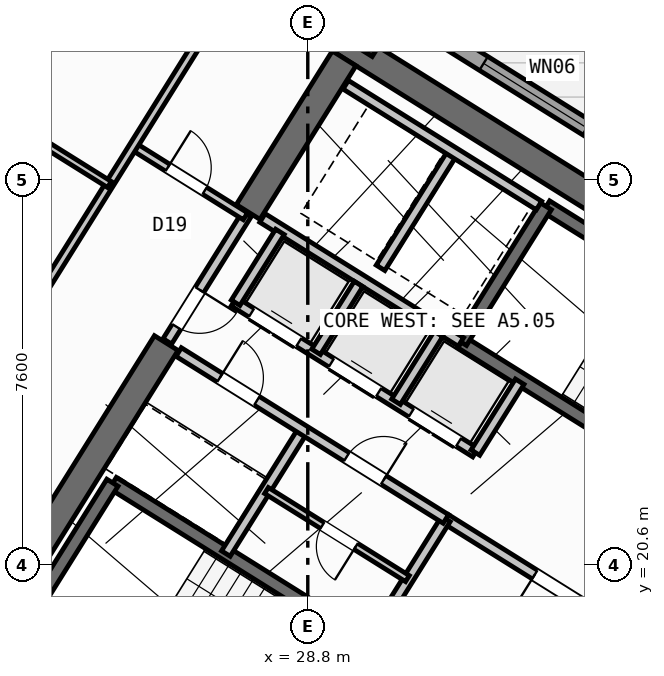
"""IFC4 building model, lengths in metres.
Left out: names, types, materials, properties, quantities, classifications, styles, units other than length and angle.
Written with IfcOpenShell. Run it as: python <this file> out.ifc"""

import sys

from ifc_helpers import new_model, si_unit, direction, frame, frame_2d, origin, origin_2d, place, context, subcontext, project, spatial, rectangle, hollow_rectangle, extrude, source, transform, mapped, element, fill, save


model = new_model("IFC4")
c1 = context("Model", 3, precision=1e-05, world=origin(), true_north=direction((0.0, 1.0)))
c2 = subcontext(c1, "Body", "Model", "MODEL_VIEW")
j1 = project(units=[si_unit("LENGTHUNIT", "METRE"), si_unit("PLANEANGLEUNIT", "RADIAN")], contexts=[c1])
p1 = place(None, origin())
s1 = spatial("IfcSite", under=j1, at=p1, CompositionType="ELEMENT")
p2 = place(p1, origin())
s2 = spatial("IfcBuilding", under=s1, at=p2, CompositionType="ELEMENT")
p3 = place(p2, frame((0.0, 0.0, 127.8)))
s3 = spatial("IfcBuildingStorey", under=s2, at=p3, CompositionType="ELEMENT", Elevation=127.8)
p4 = place(p3, frame((40.573, 24.01, 0.0), z_axis=(0.0, 0.0, 1.0), x_axis=(-0.848047359947, 0.529920442413, 0.0)))
e1 = element("IfcWall", 1, at=p4, inside=s3, PredefinedType="SHEAR", context=c2, shape_type="SweptSolid", body=[
    extrude(rectangle(XDim=13.14, YDim=0.55, at=frame_2d((6.57, 0.0))), origin(), (0.0, 0.0, 1.0), 4.55),
])
p5 = place(p3, frame((29.517, 30.594, 0.0), z_axis=(0.0, 0.0, 1.0), x_axis=(-0.529906864564, -0.848055844204, 0.0)))
e2 = element("IfcWall", 2, at=p5, inside=s3, PredefinedType="SHEAR", context=c2, shape_type="SweptSolid", body=[
    extrude(rectangle(XDim=3.575, YDim=0.55, at=frame_2d((1.788, 0.0))), origin(), (0.0, 0.0, 1.0), 4.55),
])
p6 = place(p3, frame((26.007, 24.976, 0.0), z_axis=(0.0, 0.0, 1.0), x_axis=(-0.529923795287, -0.848045264823, 0.0)))
e3 = element("IfcWall", 3, at=p6, inside=s3, PredefinedType="SHEAR", context=c2, shape_type="SweptSolid", body=[
    extrude(rectangle(XDim=6.425, YDim=0.55, at=frame_2d((3.212, 0.0))), origin(), (0.0, 0.0, 1.0), 4.55),
])
m1 = source(origin(), c2, "Body", "SweptSolid", [
    extrude(hollow_rectangle(XDim=0.9, YDim=0.9, WallThickness=0.036, at=origin_2d()), origin(), (0.0, 0.0, 1.0), 4.8),
])
p7 = place(p3, frame((29.928, 31.251, 0.0), z_axis=(0.0, 0.0, 1.0), x_axis=(-0.848048096156, 0.529919264233, 0.0)))
e4 = element("IfcColumn", 4, at=p7, inside=s3, PredefinedType="COLUMN", context=c2, shape_type="MappedRepresentation", body=[
    mapped(m1, transform((0.0, 0.0, 0.0), scale=1.0)),
])
p8 = place(p3, frame((29.268, 6.429, 0.0), z_axis=(0.0, 0.0, 1.0), x_axis=(-0.848049971435, 0.529916263149, 0.0)))
e5 = element("IfcWall", 5, at=p8, inside=s3, PredefinedType="STANDARD", context=c2, shape_type="SweptSolid", body=[
    extrude(rectangle(XDim=31.588, YDim=0.32, at=frame_2d((15.794, 0.0))), origin(), (0.0, 0.0, 1.0), 4.55),
])
p9 = place(p8, frame((15.901, 0.0, 0.0)))
e6 = element("IfcOpeningElement", 6, at=p9, cuts=e5, PredefinedType="OPENING", context=c2, shape_type="SweptSolid", body=[
    extrude(rectangle(XDim=1.2, YDim=2.15, at=frame_2d((0.6, 1.075))), frame((0.0, 0.17, 0.0), z_axis=(0.0, -1.0, 0.0), x_axis=(1.0, 0.0, 0.0)), (0.0, 0.0, 1.0), 0.34),
])
p10 = place(p8, frame((3.454, 0.0, 0.95)))
e7 = element("IfcOpeningElement", 7, at=p10, cuts=e5, PredefinedType="OPENING", context=c2, shape_type="SweptSolid", body=[
    extrude(rectangle(XDim=1.2, YDim=1.4, at=frame_2d((0.6, 0.7))), frame((0.0, 0.17, 0.0), z_axis=(0.0, -1.0, 0.0), x_axis=(1.0, 0.0, 0.0)), (0.0, 0.0, 1.0), 0.34),
])
p11 = place(p8, frame((7.561, 0.0, 0.85)))
e8 = element("IfcOpeningElement", 8, at=p11, cuts=e5, PredefinedType="OPENING", context=c2, shape_type="SweptSolid", body=[
    extrude(rectangle(XDim=1.8, YDim=1.5, at=frame_2d((0.9, 0.75))), frame((0.0, 0.17, 0.0), z_axis=(0.0, -1.0, 0.0), x_axis=(1.0, 0.0, 0.0)), (0.0, 0.0, 1.0), 0.34),
])
p12 = place(p8, frame((21.594, 0.0, 0.95)))
e9 = element("IfcOpeningElement", 9, at=p12, cuts=e5, PredefinedType="OPENING", context=c2, shape_type="SweptSolid", body=[
    extrude(rectangle(XDim=1.2, YDim=1.4, at=frame_2d((0.6, 0.7))), frame((0.0, 0.17, 0.0), z_axis=(0.0, -1.0, 0.0), x_axis=(1.0, 0.0, 0.0)), (0.0, 0.0, 1.0), 0.34),
])
p13 = place(p8, frame((29.878, 0.0, 1.0)))
e10 = element("IfcOpeningElement", 10, at=p13, cuts=e5, PredefinedType="OPENING", context=c2, shape_type="SweptSolid", body=[
    extrude(rectangle(XDim=0.9, YDim=1.25, at=frame_2d((0.45, 0.625))), frame((0.0, 0.17, 0.0), z_axis=(0.0, -1.0, 0.0), x_axis=(1.0, 0.0, 0.0)), (0.0, 0.0, 1.0), 0.34),
])
p14 = place(p8, frame((27.364, 0.0, 1.0)))
e11 = element("IfcOpeningElement", 11, at=p14, cuts=e5, PredefinedType="OPENING", context=c2, shape_type="SweptSolid", body=[
    extrude(rectangle(XDim=0.9, YDim=1.25, at=frame_2d((0.45, 0.625))), frame((0.0, 0.17, 0.0), z_axis=(0.0, -1.0, 0.0), x_axis=(1.0, 0.0, 0.0)), (0.0, 0.0, 1.0), 0.34),
])
p15 = place(p3, frame((14.138, 41.825, 0.0), z_axis=(0.0, 0.0, 1.0), x_axis=(0.848046498049, -0.529921821731, 0.0)))
e12 = element("IfcWall", 12, at=p15, inside=s3, PredefinedType="STANDARD", context=c2, shape_type="SweptSolid", body=[
    extrude(rectangle(XDim=31.588, YDim=0.32, at=frame_2d((15.794, 0.0))), origin(), (0.0, 0.0, 1.0), 4.55),
])
p16 = place(p15, frame((9.69, 0.0, 0.0)))
e13 = element("IfcOpeningElement", 13, at=p16, cuts=e12, PredefinedType="OPENING", context=c2, shape_type="SweptSolid", body=[
    extrude(rectangle(XDim=1.05, YDim=2.15, at=frame_2d((0.525, 1.075))), frame((0.0, 0.17, 0.0), z_axis=(0.0, -1.0, 0.0), x_axis=(1.0, 0.0, 0.0)), (0.0, 0.0, 1.0), 0.34),
])
p17 = place(p15, frame((14.666, 0.0, 0.0)))
e14 = element("IfcOpeningElement", 14, at=p17, cuts=e12, PredefinedType="OPENING", context=c2, shape_type="SweptSolid", body=[
    extrude(rectangle(XDim=1.5, YDim=2.25, at=frame_2d((0.75, 1.125))), frame((0.0, 0.17, 0.0), z_axis=(0.0, -1.0, 0.0), x_axis=(1.0, 0.0, 0.0)), (0.0, 0.0, 1.0), 0.34),
])
p18 = place(p15, frame((0.791, 0.0, 0.85)))
e15 = element("IfcOpeningElement", 15, at=p18, cuts=e12, PredefinedType="OPENING", context=c2, shape_type="SweptSolid", body=[
    extrude(rectangle(XDim=1.8, YDim=1.5, at=frame_2d((0.9, 0.75))), frame((0.0, 0.17, 0.0), z_axis=(0.0, -1.0, 0.0), x_axis=(1.0, 0.0, 0.0)), (0.0, 0.0, 1.0), 0.34),
])
p19 = place(p15, frame((3.996, 0.0, 0.95)))
e16 = element("IfcOpeningElement", 16, at=p19, cuts=e12, PredefinedType="OPENING", context=c2, shape_type="SweptSolid", body=[
    extrude(rectangle(XDim=1.2, YDim=1.4, at=frame_2d((0.6, 0.7))), frame((0.0, 0.17, 0.0), z_axis=(0.0, -1.0, 0.0), x_axis=(1.0, 0.0, 0.0)), (0.0, 0.0, 1.0), 0.34),
])
p20 = place(p15, frame((7.582, 0.0, 0.95)))
e17 = element("IfcOpeningElement", 17, at=p20, cuts=e12, PredefinedType="OPENING", context=c2, shape_type="SweptSolid", body=[
    extrude(rectangle(XDim=1.2, YDim=1.4, at=frame_2d((0.6, 0.7))), frame((0.0, 0.17, 0.0), z_axis=(0.0, -1.0, 0.0), x_axis=(1.0, 0.0, 0.0)), (0.0, 0.0, 1.0), 0.34),
])
p21 = place(p15, frame((21.381, 0.0, 0.75)))
e18 = element("IfcOpeningElement", 18, at=p21, cuts=e12, PredefinedType="OPENING", context=c2, shape_type="SweptSolid", body=[
    extrude(rectangle(XDim=2.4, YDim=1.6, at=frame_2d((1.2, 0.8))), frame((0.0, 0.17, 0.0), z_axis=(0.0, -1.0, 0.0), x_axis=(1.0, 0.0, 0.0)), (0.0, 0.0, 1.0), 0.34),
])
p22 = place(p15, frame((26.956, 0.0, 0.75)))
e19 = element("IfcOpeningElement", 19, at=p22, cuts=e12, PredefinedType="OPENING", context=c2, shape_type="SweptSolid", body=[
    extrude(rectangle(XDim=2.4, YDim=1.6, at=frame_2d((1.2, 0.8))), frame((0.0, 0.17, 0.0), z_axis=(0.0, -1.0, 0.0), x_axis=(1.0, 0.0, 0.0)), (0.0, 0.0, 1.0), 0.34),
])
p23 = place(p3, frame((31.28, 18.261, 0.0), z_axis=(0.0, 0.0, 1.0), x_axis=(-0.848051618787, 0.529913626805, 0.0)))
e20 = element("IfcWall", 20, at=p23, inside=s3, PredefinedType="SHEAR", context=c2, shape_type="SweptSolid", body=[
    extrude(rectangle(XDim=7.46, YDim=0.26, at=frame_2d((3.73, 0.0))), origin(), (0.0, 0.0, 1.0), 4.55),
])
p24 = place(p23, frame((0.36, 0.0, 0.0)))
e21 = element("IfcOpeningElement", 21, at=p24, cuts=e20, PredefinedType="OPENING", context=c2, shape_type="SweptSolid", body=[
    extrude(rectangle(XDim=0.86, YDim=2.05, at=frame_2d((0.43, 1.025))), frame((0.0, 0.14, 0.0), z_axis=(0.0, -1.0, 0.0), x_axis=(1.0, 0.0, 0.0)), (0.0, 0.0, 1.0), 0.28),
])
p25 = place(p3, frame((24.945, 22.22, 0.0), z_axis=(0.0, 0.0, 1.0), x_axis=(-0.529908658664, -0.84805472316, 0.0)))
e22 = element("IfcWall", 22, at=p25, inside=s3, PredefinedType="SHEAR", context=c2, shape_type="SweptSolid", body=[
    extrude(rectangle(XDim=3.16, YDim=0.26, at=frame_2d((1.58, 0.0))), origin(), (0.0, 0.0, 1.0), 4.55),
])
p26 = place(p3, frame((39.721, 23.788, 0.0), z_axis=(0.0, 0.0, 1.0), x_axis=(-0.848054434086, 0.529909121291, 0.0)))
e23 = element("IfcWall", 23, at=p26, inside=s3, PredefinedType="SHEAR", context=c2, shape_type="SweptSolid", body=[
    extrude(rectangle(XDim=7.33, YDim=0.26, at=frame_2d((3.665, 0.0))), origin(), (0.0, 0.0, 1.0), 4.55),
])
p27 = place(p3, frame((38.046, 21.108, 0.0), z_axis=(0.0, 0.0, 1.0), x_axis=(-0.848054434086, 0.529909121291, 0.0)))
e24 = element("IfcWall", 24, at=p27, inside=s3, PredefinedType="SHEAR", context=c2, shape_type="SweptSolid", body=[
    extrude(rectangle(XDim=7.33, YDim=0.26, at=frame_2d((3.665, 0.0))), origin(), (0.0, 0.0, 1.0), 4.55),
])
p28 = place(p27, frame((0.22, 0.0, 0.0)))
e25 = element("IfcOpeningElement", 25, at=p28, cuts=e24, PredefinedType="OPENING", context=c2, shape_type="SweptSolid", body=[
    extrude(rectangle(XDim=1.1, YDim=2.1, at=frame_2d((0.55, 1.05))), frame((0.0, 0.14, 0.0), z_axis=(0.0, -1.0, 0.0), x_axis=(1.0, 0.0, 0.0)), (0.0, 0.0, 1.0), 0.28),
])
p29 = place(p3, frame((33.496, 27.677, 0.0), z_axis=(0.0, 0.0, 1.0), x_axis=(-0.529908658664, -0.84805472316, 0.0)))
e26 = element("IfcWall", 26, at=p29, inside=s3, PredefinedType="SHEAR", context=c2, shape_type="SweptSolid", body=[
    extrude(rectangle(XDim=3.16, YDim=0.26, at=frame_2d((1.58, 0.0))), origin(), (0.0, 0.0, 1.0), 4.55),
])
p30 = place(p3, frame((36.417, 18.447, 0.0), z_axis=(0.0, 0.0, 1.0), x_axis=(-0.848064879198, 0.529892404805, 0.0)))
e27 = element("IfcWall", 27, at=p30, inside=s3, PredefinedType="STANDARD", context=c2, shape_type="SweptSolid", body=[
    extrude(rectangle(XDim=5.768, YDim=0.2, at=frame_2d((2.884, 0.0))), origin(), (0.0, 0.0, 1.0), 4.54),
])
p31 = place(p30, frame((2.548, 0.0, 0.0)))
e28 = element("IfcOpeningElement", 28, at=p31, cuts=e27, PredefinedType="OPENING", context=c2, shape_type="SweptSolid", body=[
    extrude(rectangle(XDim=1.15, YDim=2.1, at=frame_2d((0.575, 1.05))), frame((0.0, 0.11, 0.0), z_axis=(0.0, -1.0, 0.0), x_axis=(1.0, 0.0, 0.0)), (0.0, 0.0, 1.0), 0.22),
])
p32 = place(p3, frame((31.822, 24.998, 0.0), z_axis=(0.0, 0.0, 1.0), x_axis=(-0.848036912365, 0.52993716162, 0.0)))
e29 = element("IfcWall", 29, at=p32, inside=s3, PredefinedType="STANDARD", context=c2, shape_type="SweptSolid", body=[
    extrude(rectangle(XDim=4.618, YDim=0.2, at=frame_2d((2.309, 0.0))), origin(), (0.0, 0.0, 1.0), 4.54),
])
p33 = place(p3, frame((32.108, 22.814, 0.0), z_axis=(0.0, 0.0, 1.0), x_axis=(-0.848042229521, 0.529928652696, 0.0)))
e30 = element("IfcWall", 30, at=p33, inside=s3, PredefinedType="STANDARD", context=c2, shape_type="SweptSolid", body=[
    extrude(rectangle(XDim=5.62, YDim=0.2, at=frame_2d((2.81, 0.0))), origin(), (0.0, 0.0, 1.0), 4.54),
])
p34 = place(p33, frame((0.39, 0.0, 0.0)))
e31 = element("IfcOpeningElement", 31, at=p34, cuts=e30, PredefinedType="OPENING", context=c2, shape_type="SweptSolid", body=[
    extrude(rectangle(XDim=1.1, YDim=2.15, at=frame_2d((0.55, 1.075))), frame((0.0, 0.11, 0.0), z_axis=(0.0, -1.0, 0.0), x_axis=(1.0, 0.0, 0.0)), (0.0, 0.0, 1.0), 0.22),
])
p35 = place(p33, frame((2.25, 0.0, 0.0)))
e32 = element("IfcOpeningElement", 32, at=p35, cuts=e30, PredefinedType="OPENING", context=c2, shape_type="SweptSolid", body=[
    extrude(rectangle(XDim=1.1, YDim=2.15, at=frame_2d((0.55, 1.075))), frame((0.0, 0.11, 0.0), z_axis=(0.0, -1.0, 0.0), x_axis=(1.0, 0.0, 0.0)), (0.0, 0.0, 1.0), 0.22),
])
p36 = place(p33, frame((4.11, 0.0, 0.0)))
e33 = element("IfcOpeningElement", 33, at=p36, cuts=e30, PredefinedType="OPENING", context=c2, shape_type="SweptSolid", body=[
    extrude(rectangle(XDim=1.1, YDim=2.15, at=frame_2d((0.55, 1.075))), frame((0.0, 0.11, 0.0), z_axis=(0.0, -1.0, 0.0), x_axis=(1.0, 0.0, 0.0)), (0.0, 0.0, 1.0), 0.22),
])
p37 = place(p3, frame((32.982, 24.213, 0.0), z_axis=(0.0, 0.0, 1.0), x_axis=(-0.529839334948, -0.84809803628, 0.0)))
e34 = element("IfcWall", 34, at=p37, inside=s3, PredefinedType="STANDARD", context=c2, shape_type="SweptSolid", body=[
    extrude(rectangle(XDim=1.65, YDim=0.2, at=frame_2d((0.825, 0.0))), origin(), (0.0, 0.0, 1.0), 4.54),
])
p38 = place(p3, frame((28.25, 27.17, 0.0), z_axis=(0.0, 0.0, 1.0), x_axis=(-0.529905827651, -0.848056492117, 0.0)))
e35 = element("IfcWall", 35, at=p38, inside=s3, PredefinedType="STANDARD", context=c2, shape_type="SweptSolid", body=[
    extrude(rectangle(XDim=1.65, YDim=0.2, at=frame_2d((0.825, 0.0))), origin(), (0.0, 0.0, 1.0), 4.54),
])
p39 = place(p3, frame((31.645, 28.716, 0.0), z_axis=(0.0, 0.0, 1.0), x_axis=(-0.52986693015, -0.848080795876, 0.0)))
e36 = element("IfcWall", 36, at=p39, inside=s3, PredefinedType="STANDARD", context=c2, shape_type="SweptSolid", body=[
    extrude(rectangle(XDim=2.66, YDim=0.2, at=frame_2d((1.33, 0.0))), origin(), (0.0, 0.0, 1.0), 4.54),
])
p40 = place(p3, frame((33.363, 27.69, 0.0), z_axis=(0.0, 0.0, 1.0), x_axis=(-0.848047090064, 0.529920874315, 0.0)))
e37 = element("IfcWall", 37, at=p40, inside=s3, PredefinedType="STANDARD", context=c2, shape_type="SweptSolid", body=[
    extrude(rectangle(XDim=4.498, YDim=0.2, at=frame_2d((2.249, 0.0))), origin(), (0.0, 0.0, 1.0), 4.54),
])
for number, where, z_axis, x_axis in (
    (38, (31.379, 25.156, 0.0), (0.0, 0.0, 1.0), (-0.53, -0.848, 0.0)),
    (39, (29.801, 26.142, 0.0), (0.0, 0.0, 1.0), (-0.53, -0.848, 0.0)),
):
    element("IfcWall", number, at=place(p3, frame(where, z_axis=z_axis, x_axis=x_axis)), inside=s3, PredefinedType="STANDARD", context=c2, shape_type="SweptSolid", body=[
        extrude(rectangle(XDim=1.58, YDim=0.2, at=frame_2d((0.79, 0.0))), origin(), (0.0, 0.0, 1.0), 4.54),
    ])
for number, where, z_axis, x_axis in (
    (40, (31.525, 21.504, 0.0), (0.0, 0.0, 1.0), (-0.53, -0.848, 0.0)),
    (41, (28.71, 23.263, 0.0), (0.0, 0.0, 1.0), (-0.53, -0.848, 0.0)),
):
    element("IfcWall", number, at=place(p3, frame(where, z_axis=z_axis, x_axis=x_axis)), inside=s3, PredefinedType="STANDARD", context=c2, shape_type="SweptSolid", body=[
        extrude(rectangle(XDim=2.88, YDim=0.2, at=frame_2d((1.44, 0.0))), origin(), (0.0, 0.0, 1.0), 4.54),
    ])
p41 = place(p3, frame((31.525, 21.504, 0.0), z_axis=(0.0, 0.0, 1.0), x_axis=(-0.848040211232, 0.529931882541, 0.0)))
e42 = element("IfcWall", 42, at=p41, inside=s3, PredefinedType="STANDARD", context=c2, shape_type="SweptSolid", body=[
    extrude(rectangle(XDim=6.218, YDim=0.2, at=frame_2d((3.109, 0.0))), origin(), (0.0, 0.0, 1.0), 4.54),
])
p42 = place(p41, frame((4.4, 0.0, 0.0)))
e43 = element("IfcOpeningElement", 43, at=p42, cuts=e42, PredefinedType="OPENING", context=c2, shape_type="SweptSolid", body=[
    extrude(rectangle(XDim=0.86, YDim=2.05, at=frame_2d((0.43, 1.025))), frame((0.0, 0.11, 0.0), z_axis=(0.0, -1.0, 0.0), x_axis=(1.0, 0.0, 0.0)), (0.0, 0.0, 1.0), 0.22),
])
p43 = place(p41, frame((1.45, 0.0, 0.0)))
e44 = element("IfcOpeningElement", 44, at=p43, cuts=e42, PredefinedType="OPENING", context=c2, shape_type="SweptSolid", body=[
    extrude(rectangle(XDim=0.86, YDim=2.05, at=frame_2d((0.43, 1.025))), frame((0.0, 0.11, 0.0), z_axis=(0.0, -1.0, 0.0), x_axis=(1.0, 0.0, 0.0)), (0.0, 0.0, 1.0), 0.22),
])
p44 = place(p3, frame((30.766, 20.327, 0.0), z_axis=(0.0, 0.0, 1.0), x_axis=(-0.848052663127, 0.529911955482, 0.0)))
e45 = element("IfcWall", 45, at=p44, inside=s3, PredefinedType="PLUMBINGWALL", context=c2, shape_type="SweptSolid", body=[
    extrude(rectangle(XDim=3.28, YDim=0.14, at=frame_2d((1.64, 0.0))), origin(), (0.0, 0.0, 1.0), 4.54),
])
p45 = place(p44, frame((1.2, 0.0, 0.0)))
e46 = element("IfcOpeningElement", 46, at=p45, cuts=e45, PredefinedType="OPENING", context=c2, shape_type="SweptSolid", body=[
    extrude(rectangle(XDim=0.78, YDim=2.05, at=frame_2d((0.39, 1.025))), frame((0.0, 0.08, 0.0), z_axis=(0.0, -1.0, 0.0), x_axis=(1.0, 0.0, 0.0)), (0.0, 0.0, 1.0), 0.16),
])
p46 = place(p3, frame((27.596, 27.52, 0.0), z_axis=(0.0, 0.0, 1.0), x_axis=(-0.529865479138, -0.848081702443, 0.0)))
e47 = element("IfcWall", 47, at=p46, inside=s3, PredefinedType="STANDARD", context=c2, shape_type="SweptSolid", body=[
    extrude(rectangle(XDim=2.96, YDim=0.2, at=frame_2d((1.48, 0.0))), origin(), (0.0, 0.0, 1.0), 4.54),
])
p47 = place(p46, frame((1.76, 0.0, 0.0)))
e48 = element("IfcOpeningElement", 48, at=p47, cuts=e47, PredefinedType="OPENING", context=c2, shape_type="SweptSolid", body=[
    extrude(rectangle(XDim=0.86, YDim=2.05, at=frame_2d((0.43, 1.025))), frame((0.0, 0.11, 0.0), z_axis=(0.0, -1.0, 0.0), x_axis=(1.0, 0.0, 0.0)), (0.0, 0.0, 1.0), 0.22),
])
p48 = place(p3, frame((27.57, 27.478, 0.0), z_axis=(0.0, 0.0, 1.0), x_axis=(-0.848050851465, 0.529914854792, 0.0)))
e49 = element("IfcWall", 49, at=p48, inside=s3, PredefinedType="PARTITIONING", context=c2, shape_type="SweptSolid", body=[
    extrude(rectangle(XDim=2.61, YDim=0.16, at=frame_2d((1.305, 0.0))), origin(), (0.0, 0.0, 1.0), 4.54),
])
p49 = place(p48, frame((0.95, 0.0, 0.0)))
e50 = element("IfcOpeningElement", 50, at=p49, cuts=e49, PredefinedType="OPENING", context=c2, shape_type="SweptSolid", body=[
    extrude(rectangle(XDim=0.86, YDim=2.05, at=frame_2d((0.43, 1.025))), frame((0.0, 0.09, 0.0), z_axis=(0.0, -1.0, 0.0), x_axis=(1.0, 0.0, 0.0)), (0.0, 0.0, 1.0), 0.18),
])
p50 = place(p3, frame((27.953, 33.016, 0.0), z_axis=(0.0, 0.0, 1.0), x_axis=(-0.529909450694, -0.848054228257, 0.0)))
e51 = element("IfcWall", 51, at=p50, inside=s3, PredefinedType="PARTITIONING", context=c2, shape_type="SweptSolid", body=[
    extrude(rectangle(XDim=10.3, YDim=0.16, at=frame_2d((5.15, 0.0))), origin(), (0.0, 0.0, 1.0), 4.54),
])
p51 = place(p3, frame((24.256, 34.251, 0.0), z_axis=(0.0, 0.0, 1.0), x_axis=(-0.529919772691, -0.848047778437, 0.0)))
e52 = element("IfcWall", 52, at=p51, inside=s3, PredefinedType="PARTITIONING", context=c2, shape_type="SweptSolid", body=[
    extrude(rectangle(XDim=6.376, YDim=0.16, at=frame_2d((3.188, 0.0))), origin(), (0.0, 0.0, 1.0), 3.975),
])
p52 = place(p3, frame((24.885, 28.106, 0.0), z_axis=(0.0, 0.0, 1.0), x_axis=(-0.848059820872, 0.529900500304, 0.0)))
e53 = element("IfcWall", 53, at=p52, inside=s3, PredefinedType="PLUMBINGWALL", context=c2, shape_type="SweptSolid", body=[
    extrude(rectangle(XDim=3.79, YDim=0.14, at=frame_2d((1.895, 0.0))), origin(), (0.0, 0.0, 1.0), 4.54),
])
p53 = place(p52, frame((2.23, 0.0, 0.0)))
e54 = element("IfcOpeningElement", 54, at=p53, cuts=e53, PredefinedType="OPENING", context=c2, shape_type="SweptSolid", body=[
    extrude(rectangle(XDim=0.92, YDim=2.08, at=frame_2d((0.46, 1.04))), frame((0.0, 0.08, 0.0), z_axis=(0.0, -1.0, 0.0), x_axis=(1.0, 0.0, 0.0)), (0.0, 0.0, 1.0), 0.16),
])
m2 = source(origin(), c2, "Body", "SweptSolid", [
    extrude(rectangle(XDim=2.4, YDim=1.6, at=frame_2d((1.2, 0.8))), frame((0.0, 0.03, 0.0), z_axis=(0.0, -1.0, 0.0), x_axis=(1.0, 0.0, 0.0)), (0.0, 0.0, 1.0), 0.06),
])
p54 = place(p21, origin())
e55 = element("IfcWindow", 55, at=p54, inside=s3, PartitioningType="SINGLE_PANEL", PredefinedType="WINDOW", context=c2, shape_type="MappedRepresentation", body=[
    mapped(m2, transform((0.0, 0.0, 0.0), scale=1.0)),
])
fill(e18, e55)
m3 = source(origin(), c2, "Body", "SweptSolid", [
    extrude(rectangle(XDim=1.15, YDim=2.1, at=frame_2d((0.575, 1.05))), frame((0.0, 0.025, 0.0), z_axis=(0.0, -1.0, 0.0), x_axis=(1.0, 0.0, 0.0)), (0.0, 0.0, 1.0), 0.05),
])
p55 = place(p31, origin())
e56 = element("IfcDoor", 56, at=p55, inside=s3, OperationType="SINGLE_SWING_RIGHT", PredefinedType="DOOR", context=c2, shape_type="MappedRepresentation", body=[
    mapped(m3, transform((0.0, 0.0, 0.0), scale=1.0)),
])
fill(e28, e56)
m4 = source(origin(), c2, "Body", "SweptSolid", [
    extrude(rectangle(XDim=1.1, YDim=2.15, at=frame_2d((0.55, 1.075))), frame((0.0, 0.025, 0.0), z_axis=(0.0, -1.0, 0.0), x_axis=(1.0, 0.0, 0.0)), (0.0, 0.0, 1.0), 0.05),
])
p56 = place(p34, origin())
e57 = element("IfcDoor", 57, at=p56, inside=s3, OperationType="DOUBLE_DOOR_SLIDING", PredefinedType="DOOR", context=c2, shape_type="MappedRepresentation", body=[
    mapped(m4, transform((0.0, 0.0, 0.0), scale=1.0)),
])
fill(e31, e57)
p57 = place(p35, origin())
e58 = element("IfcDoor", 58, at=p57, inside=s3, OperationType="DOUBLE_DOOR_SLIDING", PredefinedType="DOOR", context=c2, shape_type="MappedRepresentation", body=[
    mapped(m4, transform((0.0, 0.0, 0.0), scale=1.0)),
])
fill(e32, e58)
p58 = place(p36, origin())
e59 = element("IfcDoor", 59, at=p58, inside=s3, OperationType="DOUBLE_DOOR_SLIDING", PredefinedType="DOOR", context=c2, shape_type="MappedRepresentation", body=[
    mapped(m4, transform((0.0, 0.0, 0.0), scale=1.0)),
])
fill(e33, e59)
m5 = source(origin(), c2, "Body", "SweptSolid", [
    extrude(rectangle(XDim=0.86, YDim=2.05, at=frame_2d((0.43, 1.025))), frame((0.0, 0.025, 0.0), z_axis=(0.0, -1.0, 0.0), x_axis=(1.0, 0.0, 0.0)), (0.0, 0.0, 1.0), 0.05),
])
p59 = place(p42, frame((0.86, 0.0, 0.0), z_axis=(0.0, 0.0, 1.0), x_axis=(-1.0, 0.0, 0.0)))
e60 = element("IfcDoor", 60, at=p59, inside=s3, OperationType="SINGLE_SWING_LEFT", PredefinedType="DOOR", context=c2, shape_type="MappedRepresentation", body=[
    mapped(m5, transform((0.0, 0.0, 0.0), scale=1.0)),
])
fill(e43, e60)
p60 = place(p43, frame((0.86, 0.0, 0.0), z_axis=(0.0, 0.0, 1.0), x_axis=(-1.0, 0.0, 0.0)))
e61 = element("IfcDoor", 61, at=p60, inside=s3, OperationType="SINGLE_SWING_RIGHT", PredefinedType="DOOR", context=c2, shape_type="MappedRepresentation", body=[
    mapped(m5, transform((0.0, 0.0, 0.0), scale=1.0)),
])
fill(e44, e61)
m6 = source(origin(), c2, "Body", "SweptSolid", [
    extrude(rectangle(XDim=0.78, YDim=2.05, at=frame_2d((0.39, 1.025))), frame((0.0, 0.025, 0.0), z_axis=(0.0, -1.0, 0.0), x_axis=(1.0, 0.0, 0.0)), (0.0, 0.0, 1.0), 0.05),
])
p61 = place(p45, origin())
e62 = element("IfcDoor", 62, at=p61, inside=s3, OperationType="SINGLE_SWING_LEFT", PredefinedType="DOOR", context=c2, shape_type="MappedRepresentation", body=[
    mapped(m6, transform((0.0, 0.0, 0.0), scale=1.0)),
])
fill(e46, e62)
p62 = place(p49, frame((0.86, 0.0, 0.0), z_axis=(0.0, 0.0, 1.0), x_axis=(-1.0, 0.0, 0.0)))
e63 = element("IfcDoor", 63, at=p62, inside=s3, OperationType="SINGLE_SWING_LEFT", PredefinedType="DOOR", context=c2, shape_type="MappedRepresentation", body=[
    mapped(m5, transform((0.0, 0.0, 0.0), scale=1.0)),
])
fill(e50, e63)
p63 = place(p47, origin())
e64 = element("IfcDoor", 64, at=p63, inside=s3, OperationType="SINGLE_SWING_LEFT", PredefinedType="DOOR", context=c2, shape_type="MappedRepresentation", body=[
    mapped(m5, transform((0.0, 0.0, 0.0), scale=1.0)),
])
fill(e48, e64)
save(model, sys.argv[1])
